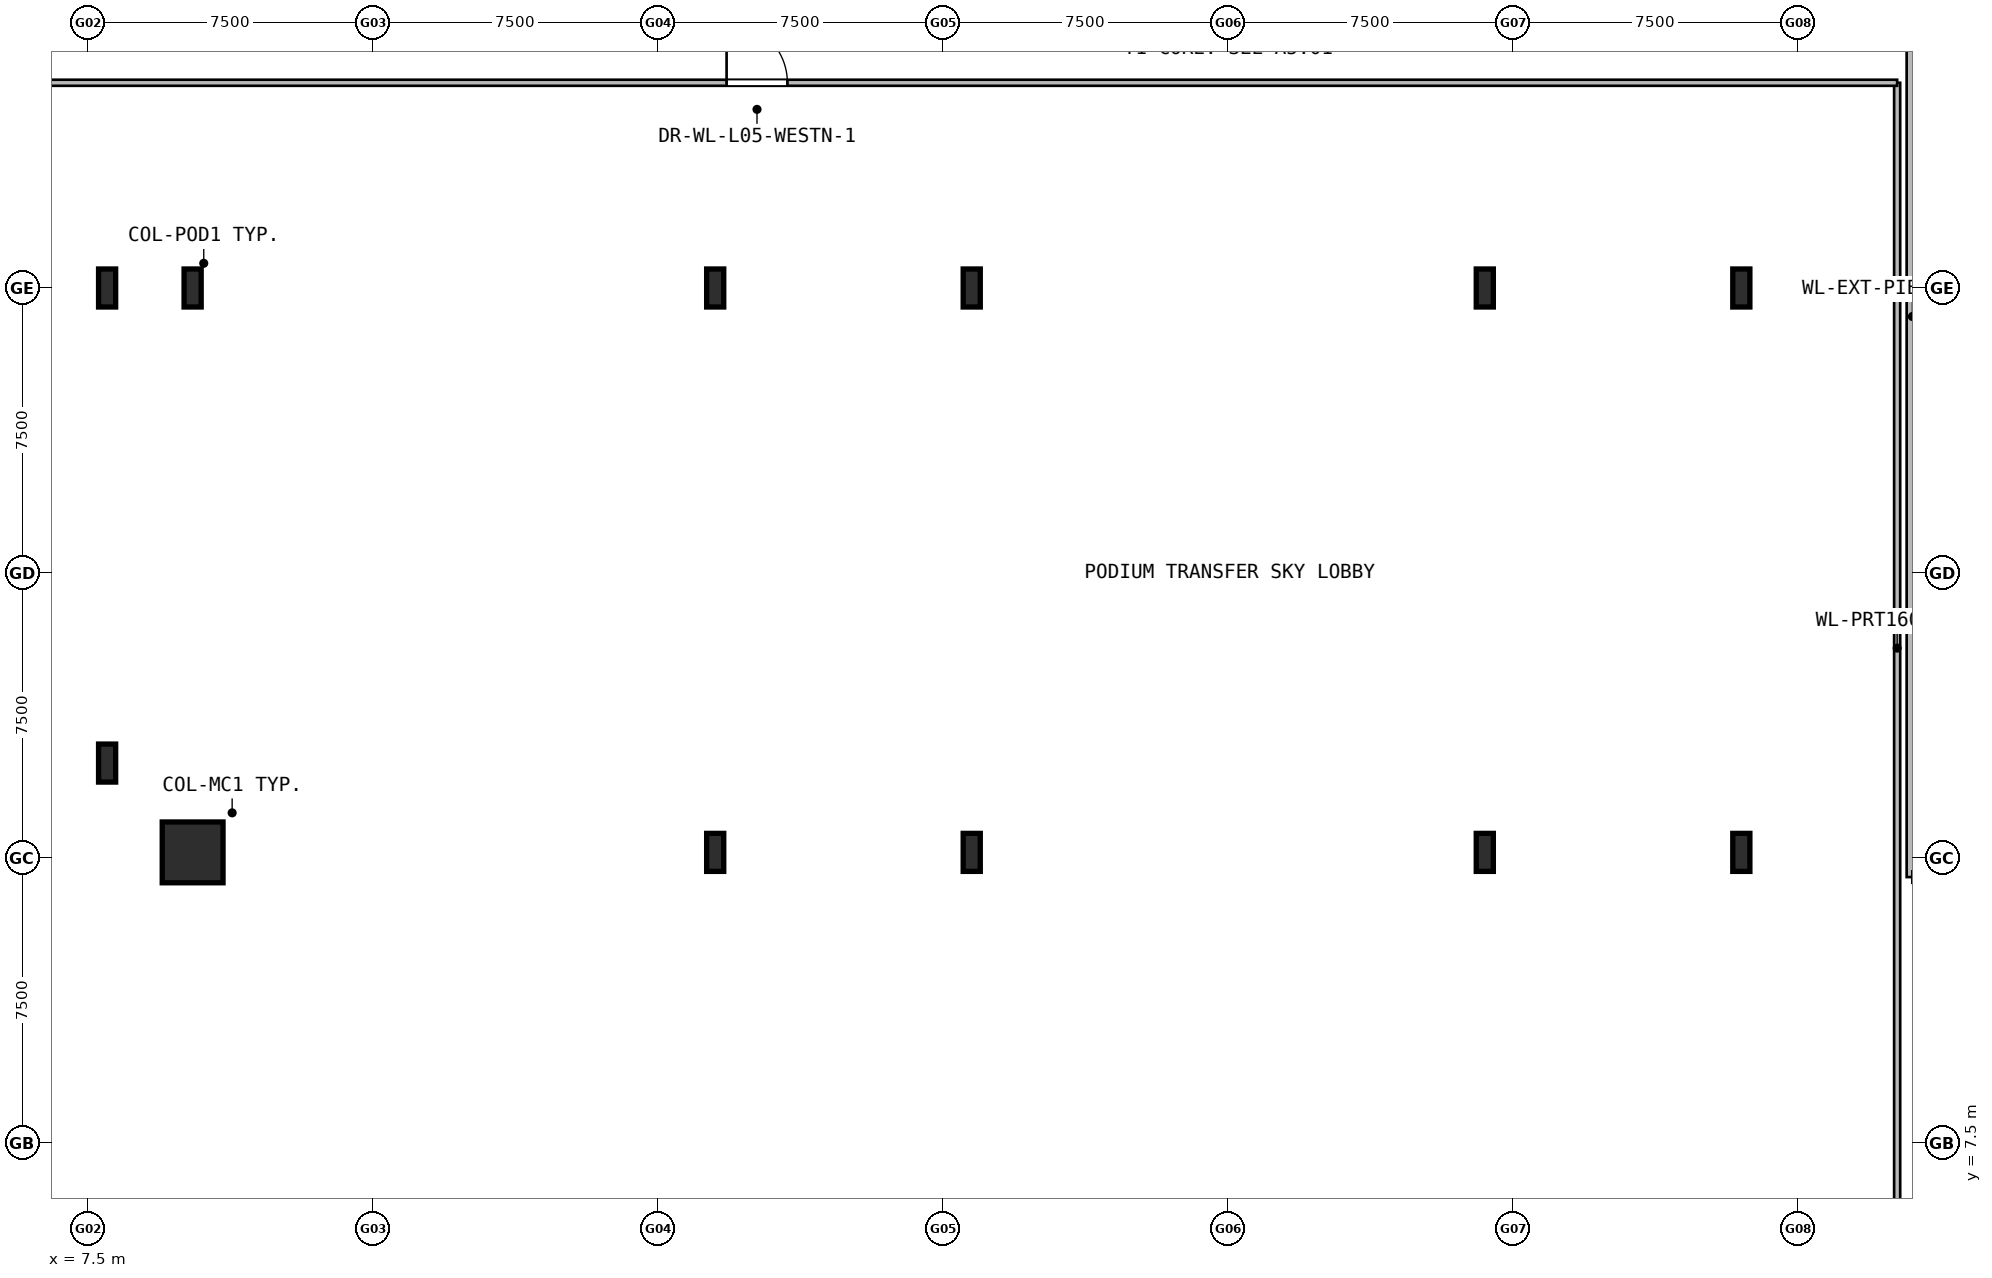
"""IFC4 building model, lengths in metres.
Left out: names, types, materials, properties, quantities, classifications, styles, units other than length and angle.
Written with IfcOpenShell. Run it as: python <this file> out.ifc"""

import sys

from ifc_helpers import new_model, si_unit, direction, frame, frame_2d, origin, origin_2d, place, context, subcontext, project, spatial, rectangle, hollow_rectangle, i_section, extrude, element, fill, save


model = new_model("IFC4")
c1 = context("Model", 3, precision=1e-05, world=origin(), true_north=direction((0.0, 1.0)))
c2 = subcontext(c1, "Body", "Model", "MODEL_VIEW")
j1 = project(units=[si_unit("LENGTHUNIT", "METRE"), si_unit("PLANEANGLEUNIT", "RADIAN")], contexts=[c1])
p1 = place(None, origin())
s1 = spatial("IfcSite", under=j1, at=p1, CompositionType="ELEMENT")
p2 = place(p1, origin())
s2 = spatial("IfcBuilding", under=s1, at=p2, CompositionType="ELEMENT")
p3 = place(p2, frame((0.0, 0.0, 25.2)))
s3 = spatial("IfcBuildingStorey", under=s2, at=p3, CompositionType="ELEMENT", Elevation=25.2)
p4 = place(p3, frame((10.25, 15.15, 0.0), z_axis=(0.0, 0.0, 1.0), x_axis=(1.0, 0.0, 0.0)))
e1 = element("IfcColumn", 1, at=p4, inside=s3, PredefinedType="COLUMN", context=c2, shape_type="SweptSolid", body=[
    extrude(hollow_rectangle(XDim=1.6, YDim=1.6, WallThickness=0.04, at=origin_2d()), origin(), (0.0, 0.0, 1.0), 5.15),
])
for number, where, z_axis, x_axis in (
    (2, (10.25, 30.0, 0.0), (0.0, 0.0, 1.0), (1.0, 0.0, 0.0)),
    (3, (24.0, 15.15, 0.0), (0.0, 0.0, 1.0), (1.0, 0.0, 0.0)),
    (4, (24.0, 30.0, 0.0), (0.0, 0.0, 1.0), (1.0, 0.0, 0.0)),
    (5, (30.75, 15.15, 0.0), (0.0, 0.0, 1.0), (1.0, 0.0, 0.0)),
    (6, (30.75, 30.0, 0.0), (0.0, 0.0, 1.0), (1.0, 0.0, 0.0)),
    (7, (44.25, 15.15, 0.0), (0.0, 0.0, 1.0), (1.0, 0.0, 0.0)),
    (8, (44.25, 30.0, 0.0), (0.0, 0.0, 1.0), (1.0, 0.0, 0.0)),
    (9, (51.0, 15.15, 0.0), (0.0, 0.0, 1.0), (1.0, 0.0, 0.0)),
    (10, (51.0, 30.0, 0.0), (0.0, 0.0, 1.0), (1.0, 0.0, 0.0)),
    (11, (8.0, 17.5, 0.0), (0.0, 0.0, 1.0), (1.0, 0.0, 0.0)),
    (12, (8.0, 30.0, 0.0), (0.0, 0.0, 1.0), (1.0, 0.0, 0.0)),
):
    element("IfcColumn", number, at=place(p3, frame(where, z_axis=z_axis, x_axis=x_axis)), inside=s3, PredefinedType="COLUMN", context=c2, shape_type="SweptSolid", body=[
        extrude(i_section(OverallWidth=0.45, OverallDepth=1.0, WebThickness=0.022, FlangeThickness=0.04, at=origin_2d()), origin(), (0.0, 0.0, 1.0), 5.4),
    ])
p5 = place(p3, frame((55.5, 14.5, 0.0), z_axis=(0.0, 0.0, 1.0), x_axis=(0.0, 1.0, 0.0)))
e13 = element("IfcWall", 13, at=p5, inside=s3, PredefinedType="SOLIDWALL", context=c2, shape_type="SweptSolid", body=[
    extrude(rectangle(XDim=29.5, YDim=0.3, at=frame_2d((14.75, 0.0))), origin(), (0.0, 0.0, 1.0), 2.63),
])
p6 = place(p3, frame((55.1, 5.65, 0.0), z_axis=(0.0, 0.0, 1.0), x_axis=(0.0, 1.0, 0.0)))
e14 = element("IfcWall", 14, at=p6, inside=s3, PredefinedType="PARTITIONING", context=c2, shape_type="SweptSolid", body=[
    extrude(rectangle(XDim=29.75, YDim=0.16, at=frame_2d((14.875, 0.0))), origin(), (0.0, 0.0, 1.0), 2.63),
])
p7 = place(p3, frame((6.15, 35.4, 0.0), z_axis=(0.0, 0.0, 1.0), x_axis=(1.0, 0.0, 0.0)))
e15 = element("IfcWall", 15, at=p7, inside=s3, PredefinedType="PARTITIONING", context=c2, shape_type="SweptSolid", body=[
    extrude(rectangle(XDim=48.95, YDim=0.16, at=frame_2d((24.475, 0.0))), origin(), (0.0, 0.0, 1.0), 4.33),
])
p8 = place(p7, frame((18.15, 0.0, 0.0)))
e16 = element("IfcOpeningElement", 16, at=p8, cuts=e15, PredefinedType="OPENING", context=c2, shape_type="SweptSolid", body=[
    extrude(rectangle(XDim=1.6, YDim=2.2, at=frame_2d((0.8, 1.1))), frame((0.0, 0.09, 0.0), z_axis=(0.0, -1.0, 0.0), x_axis=(1.0, 0.0, 0.0)), (0.0, 0.0, 1.0), 0.18),
])
p9 = place(p8, origin())
e17 = element("IfcDoor", 17, at=p9, inside=s3, OperationType="DOUBLE_DOOR_SINGLE_SWING", PredefinedType="DOOR", context=c2, shape_type="SweptSolid", body=[
    extrude(rectangle(XDim=1.6, YDim=2.2, at=frame_2d((0.8, 1.1))), frame((0.0, 0.025, 0.0), z_axis=(0.0, -1.0, 0.0), x_axis=(1.0, 0.0, 0.0)), (0.0, 0.0, 1.0), 0.05),
])
fill(e16, e17)
save(model, sys.argv[1])
